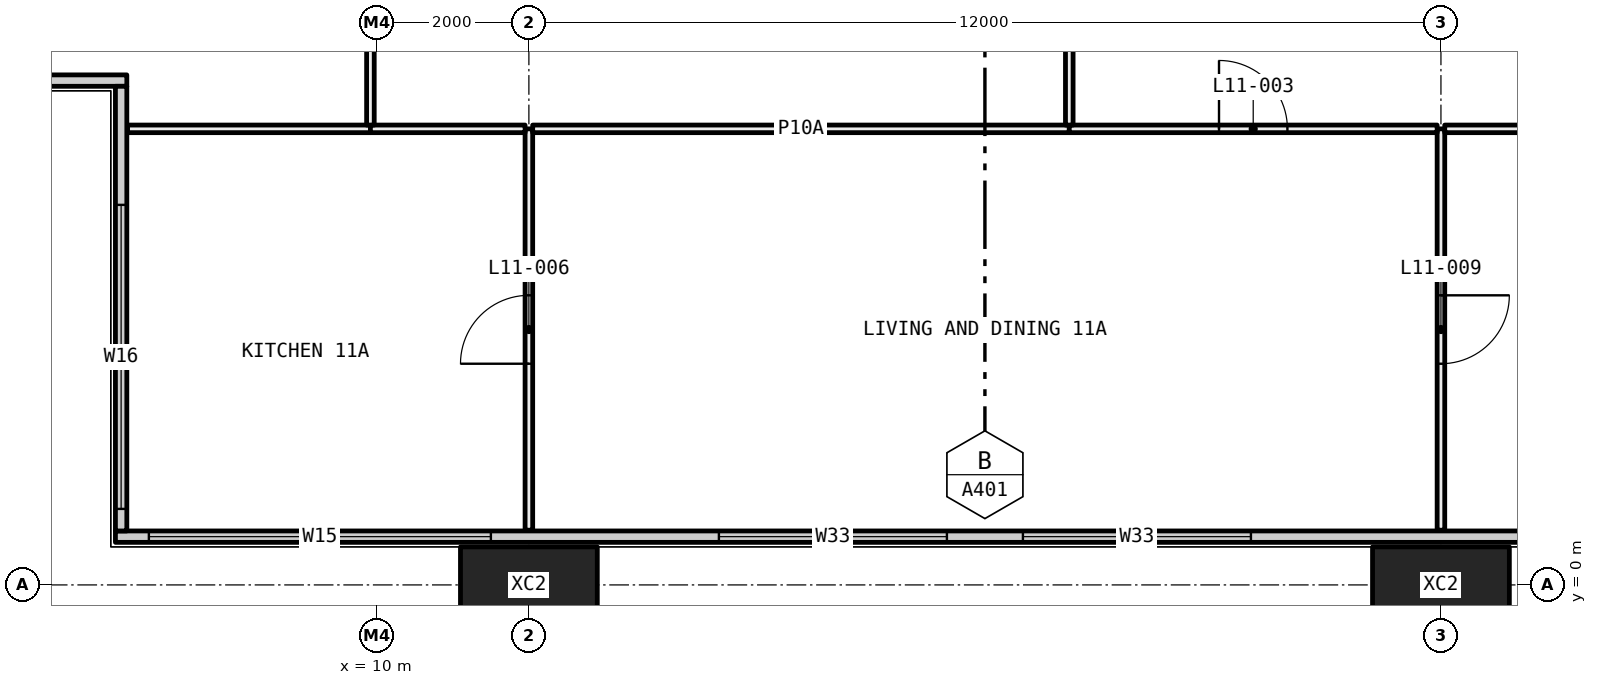
"""IFC4 building model, lengths in metres.
Left out: names, types, materials, properties, quantities, classifications, styles, units other than length and angle.
Written with IfcOpenShell. Run it as: python <this file> out.ifc"""

import sys

from ifc_helpers import new_model, si_unit, direction, frame, frame_2d, origin, origin_2d, place, context, subcontext, project, spatial, rectangle, hollow_rectangle, extrude, element, fill, save


model = new_model("IFC4")
c1 = context("Model", 3, precision=1e-05, world=origin(), true_north=direction((0.0, 1.0)))
c2 = subcontext(c1, "Body", "Model", "MODEL_VIEW")
j1 = project(units=[si_unit("LENGTHUNIT", "METRE"), si_unit("PLANEANGLEUNIT", "RADIAN")], contexts=[c1])
p1 = place(None, origin())
s1 = spatial("IfcSite", under=j1, at=p1, CompositionType="ELEMENT")
p2 = place(p1, origin())
s2 = spatial("IfcBuilding", under=s1, at=p2, CompositionType="ELEMENT")
p3 = place(p2, frame((0.0, 0.0, 50.7)))
s3 = spatial("IfcBuildingStorey", under=s2, at=p3, CompositionType="ELEMENT", Elevation=50.7)
for number, where, z_axis, x_axis in (
    (1, (12.0, 0.0, -0.4), (0.0, 0.0, 1.0), (1.0, 0.0, 0.0)),
    (2, (24.0, 0.0, -0.4), (0.0, 0.0, 1.0), (1.0, 0.0, 0.0)),
):
    element("IfcColumn", number, at=place(p3, frame(where, z_axis=z_axis, x_axis=x_axis)), inside=s3, PredefinedType="COLUMN", context=c2, shape_type="SweptSolid", body=[
        extrude(hollow_rectangle(XDim=1.8, YDim=1.0, WallThickness=0.07, at=origin_2d()), origin(), (0.0, 0.0, 1.0), 3.45),
    ])
p4 = place(p3, frame((6.56, 0.635, 0.0), z_axis=(0.0, 0.0, 1.0), x_axis=(1.0, 0.0, 0.0)))
e3 = element("IfcWall", 3, at=p4, inside=s3, PredefinedType="ELEMENTEDWALL", context=c2, shape_type="SweptSolid", body=[
    extrude(rectangle(XDim=58.88, YDim=0.15, at=frame_2d((29.44, 0.0))), origin(), (0.0, 0.0, 1.0), 3.05),
])
p5 = place(p4, frame((0.44, 0.0, 0.45)))
e4 = element("IfcOpeningElement", 4, at=p5, cuts=e3, PredefinedType="OPENING", context=c2, shape_type="SweptSolid", body=[
    extrude(rectangle(XDim=4.5, YDim=2.55, at=frame_2d((2.25, 1.275))), frame((0.0, 0.085, 0.0), z_axis=(0.0, -1.0, 0.0), x_axis=(1.0, 0.0, 0.0)), (0.0, 0.0, 1.0), 0.17),
])
p6 = place(p4, frame((7.94, 0.0, 0.45)))
e5 = element("IfcOpeningElement", 5, at=p6, cuts=e3, PredefinedType="OPENING", context=c2, shape_type="SweptSolid", body=[
    extrude(rectangle(XDim=3.0, YDim=2.55, at=frame_2d((1.5, 1.275))), frame((0.0, 0.085, 0.0), z_axis=(0.0, -1.0, 0.0), x_axis=(1.0, 0.0, 0.0)), (0.0, 0.0, 1.0), 0.17),
])
p7 = place(p4, frame((11.94, 0.0, 0.45)))
e6 = element("IfcOpeningElement", 6, at=p7, cuts=e3, PredefinedType="OPENING", context=c2, shape_type="SweptSolid", body=[
    extrude(rectangle(XDim=3.0, YDim=2.55, at=frame_2d((1.5, 1.275))), frame((0.0, 0.085, 0.0), z_axis=(0.0, -1.0, 0.0), x_axis=(1.0, 0.0, 0.0)), (0.0, 0.0, 1.0), 0.17),
])
p8 = place(p4, frame((19.94, 0.0, 0.45)))
e7 = element("IfcOpeningElement", 7, at=p8, cuts=e3, PredefinedType="OPENING", context=c2, shape_type="SweptSolid", body=[
    extrude(rectangle(XDim=3.0, YDim=2.55, at=frame_2d((1.5, 1.275))), frame((0.0, 0.085, 0.0), z_axis=(0.0, -1.0, 0.0), x_axis=(1.0, 0.0, 0.0)), (0.0, 0.0, 1.0), 0.17),
])
p9 = place(p4, frame((23.94, 0.0, 0.45)))
e8 = element("IfcOpeningElement", 8, at=p9, cuts=e3, PredefinedType="OPENING", context=c2, shape_type="SweptSolid", body=[
    extrude(rectangle(XDim=2.0, YDim=2.55, at=frame_2d((1.0, 1.275))), frame((0.0, 0.085, 0.0), z_axis=(0.0, -1.0, 0.0), x_axis=(1.0, 0.0, 0.0)), (0.0, 0.0, 1.0), 0.17),
])
p10 = place(p4, frame((31.94, 0.0, 0.45)))
e9 = element("IfcOpeningElement", 9, at=p10, cuts=e3, PredefinedType="OPENING", context=c2, shape_type="SweptSolid", body=[
    extrude(rectangle(XDim=3.0, YDim=2.55, at=frame_2d((1.5, 1.275))), frame((0.0, 0.085, 0.0), z_axis=(0.0, -1.0, 0.0), x_axis=(1.0, 0.0, 0.0)), (0.0, 0.0, 1.0), 0.17),
])
p11 = place(p4, frame((35.94, 0.0, 0.45)))
e10 = element("IfcOpeningElement", 10, at=p11, cuts=e3, PredefinedType="OPENING", context=c2, shape_type="SweptSolid", body=[
    extrude(rectangle(XDim=3.0, YDim=2.55, at=frame_2d((1.5, 1.275))), frame((0.0, 0.085, 0.0), z_axis=(0.0, -1.0, 0.0), x_axis=(1.0, 0.0, 0.0)), (0.0, 0.0, 1.0), 0.17),
])
p12 = place(p4, frame((43.94, 0.0, 0.45)))
e11 = element("IfcOpeningElement", 11, at=p12, cuts=e3, PredefinedType="OPENING", context=c2, shape_type="SweptSolid", body=[
    extrude(rectangle(XDim=3.0, YDim=2.55, at=frame_2d((1.5, 1.275))), frame((0.0, 0.085, 0.0), z_axis=(0.0, -1.0, 0.0), x_axis=(1.0, 0.0, 0.0)), (0.0, 0.0, 1.0), 0.17),
])
p13 = place(p4, frame((47.94, 0.0, 0.45)))
e12 = element("IfcOpeningElement", 12, at=p13, cuts=e3, PredefinedType="OPENING", context=c2, shape_type="SweptSolid", body=[
    extrude(rectangle(XDim=2.0, YDim=2.55, at=frame_2d((1.0, 1.275))), frame((0.0, 0.085, 0.0), z_axis=(0.0, -1.0, 0.0), x_axis=(1.0, 0.0, 0.0)), (0.0, 0.0, 1.0), 0.17),
])
p14 = place(p4, frame((53.94, 0.0, 0.45)))
e13 = element("IfcOpeningElement", 13, at=p14, cuts=e3, PredefinedType="OPENING", context=c2, shape_type="SweptSolid", body=[
    extrude(rectangle(XDim=4.5, YDim=2.55, at=frame_2d((2.25, 1.275))), frame((0.0, 0.085, 0.0), z_axis=(0.0, -1.0, 0.0), x_axis=(1.0, 0.0, 0.0)), (0.0, 0.0, 1.0), 0.17),
])
p15 = place(p3, frame((0.56, 6.635, 0.0), z_axis=(0.0, 0.0, 1.0), x_axis=(1.0, 0.0, 0.0)))
e14 = element("IfcWall", 14, at=p15, inside=s3, PredefinedType="ELEMENTEDWALL", context=c2, shape_type="SweptSolid", body=[
    extrude(rectangle(XDim=6.15, YDim=0.15, at=frame_2d((3.075, 0.0))), origin(), (0.0, 0.0, 1.0), 3.05),
])
p16 = place(p15, frame((0.44, 0.0, 0.45)))
e15 = element("IfcOpeningElement", 15, at=p16, cuts=e14, PredefinedType="OPENING", context=c2, shape_type="SweptSolid", body=[
    extrude(rectangle(XDim=4.0, YDim=2.55, at=frame_2d((2.0, 1.275))), frame((0.0, 0.085, 0.0), z_axis=(0.0, -1.0, 0.0), x_axis=(1.0, 0.0, 0.0)), (0.0, 0.0, 1.0), 0.17),
])
p17 = place(p3, frame((6.635, 0.71, 0.0), z_axis=(0.0, 0.0, 1.0), x_axis=(0.0, 1.0, 0.0)))
e16 = element("IfcWall", 16, at=p17, inside=s3, PredefinedType="ELEMENTEDWALL", context=c2, shape_type="SweptSolid", body=[
    extrude(rectangle(XDim=5.85, YDim=0.15, at=frame_2d((2.925, 0.0))), origin(), (0.0, 0.0, 1.0), 3.05),
])
p18 = place(p17, frame((0.29, 0.0, 0.45)))
e17 = element("IfcOpeningElement", 17, at=p18, cuts=e16, PredefinedType="OPENING", context=c2, shape_type="SweptSolid", body=[
    extrude(rectangle(XDim=4.0, YDim=2.55, at=frame_2d((2.0, 1.275))), frame((0.0, 0.085, 0.0), z_axis=(0.0, -1.0, 0.0), x_axis=(1.0, 0.0, 0.0)), (0.0, 0.0, 1.0), 0.17),
])
p19 = place(p3, frame((12.0, 0.72, 0.0), z_axis=(0.0, 0.0, 1.0), x_axis=(0.0, 1.0, 0.0)))
e18 = element("IfcWall", 18, at=p19, inside=s3, PredefinedType="PARTITIONING", context=c2, shape_type="SweptSolid", body=[
    extrude(rectangle(XDim=5.28, YDim=0.1, at=frame_2d((2.64, 0.0))), origin(), (0.0, 0.0, 1.0), 2.45),
])
p20 = place(p19, frame((2.19, 0.0, 0.0)))
e19 = element("IfcOpeningElement", 19, at=p20, cuts=e18, PredefinedType="OPENING", context=c2, shape_type="SweptSolid", body=[
    extrude(rectangle(XDim=0.9, YDim=2.1, at=frame_2d((0.45, 1.05))), frame((0.0, 0.06, 0.0), z_axis=(0.0, -1.0, 0.0), x_axis=(1.0, 0.0, 0.0)), (0.0, 0.0, 1.0), 0.12),
])
p21 = place(p3, frame((9.915, 6.0, 0.0), z_axis=(0.0, 0.0, 1.0), x_axis=(-1.0, 0.0, 0.0)))
e20 = element("IfcWall", 20, at=p21, inside=s3, PredefinedType="PARTITIONING", context=c2, shape_type="SweptSolid", body=[
    extrude(rectangle(XDim=3.195, YDim=0.1, at=frame_2d((1.598, 0.0))), origin(), (0.0, 0.0, 1.0), 3.05),
])
p22 = place(p3, frame((11.95, 6.0, 0.0), z_axis=(0.0, 0.0, 1.0), x_axis=(-1.0, 0.0, 0.0)))
e21 = element("IfcWall", 21, at=p22, inside=s3, PredefinedType="PARTITIONING", context=c2, shape_type="SweptSolid", body=[
    extrude(rectangle(XDim=2.035, YDim=0.1, at=frame_2d((1.018, 0.0))), origin(), (0.0, 0.0, 1.0), 2.45),
])
p23 = place(p3, frame((24.0, 0.72, 0.0), z_axis=(0.0, 0.0, 1.0), x_axis=(0.0, 1.0, 0.0)))
e22 = element("IfcWall", 22, at=p23, inside=s3, PredefinedType="PARTITIONING", context=c2, shape_type="SweptSolid", body=[
    extrude(rectangle(XDim=5.28, YDim=0.1, at=frame_2d((2.64, 0.0))), origin(), (0.0, 0.0, 1.0), 2.45),
])
p24 = place(p23, frame((2.19, 0.0, 0.0)))
e23 = element("IfcOpeningElement", 23, at=p24, cuts=e22, PredefinedType="OPENING", context=c2, shape_type="SweptSolid", body=[
    extrude(rectangle(XDim=0.9, YDim=2.1, at=frame_2d((0.45, 1.05))), frame((0.0, 0.06, 0.0), z_axis=(0.0, -1.0, 0.0), x_axis=(1.0, 0.0, 0.0)), (0.0, 0.0, 1.0), 0.12),
])
p25 = place(p3, frame((19.11, 6.0, 0.0), z_axis=(0.0, 0.0, 1.0), x_axis=(-1.0, 0.0, 0.0)))
e24 = element("IfcWall", 24, at=p25, inside=s3, PredefinedType="PARTITIONING", context=c2, shape_type="SweptSolid", body=[
    extrude(rectangle(XDim=7.06, YDim=0.1, at=frame_2d((3.53, 0.0))), origin(), (0.0, 0.0, 1.0), 2.45),
])
p26 = place(p3, frame((23.95, 6.0, 0.0), z_axis=(0.0, 0.0, 1.0), x_axis=(-1.0, 0.0, 0.0)))
e25 = element("IfcWall", 25, at=p26, inside=s3, PredefinedType="PARTITIONING", context=c2, shape_type="SweptSolid", body=[
    extrude(rectangle(XDim=4.84, YDim=0.1, at=frame_2d((2.42, 0.0))), origin(), (0.0, 0.0, 1.0), 2.45),
])
p27 = place(p26, frame((1.97, 0.0, 0.0)))
e26 = element("IfcOpeningElement", 26, at=p27, cuts=e25, PredefinedType="OPENING", context=c2, shape_type="SweptSolid", body=[
    extrude(rectangle(XDim=0.9, YDim=2.1, at=frame_2d((0.45, 1.05))), frame((0.0, 0.06, 0.0), z_axis=(0.0, -1.0, 0.0), x_axis=(1.0, 0.0, 0.0)), (0.0, 0.0, 1.0), 0.12),
])
p28 = place(p3, frame((28.305, 6.0, 0.0), z_axis=(0.0, 0.0, 1.0), x_axis=(-1.0, 0.0, 0.0)))
e27 = element("IfcWall", 27, at=p28, inside=s3, PredefinedType="PARTITIONING", context=c2, shape_type="SweptSolid", body=[
    extrude(rectangle(XDim=4.255, YDim=0.1, at=frame_2d((2.127, 0.0))), origin(), (0.0, 0.0, 1.0), 2.45),
])
p29 = place(p3, frame((9.915, 6.05, 0.0), z_axis=(0.0, 0.0, 1.0), x_axis=(0.0, 1.0, 0.0)))
e28 = element("IfcWall", 28, at=p29, inside=s3, PredefinedType="PARTITIONING", context=c2, shape_type="SweptSolid", body=[
    extrude(rectangle(XDim=5.875, YDim=0.1, at=frame_2d((2.938, 0.0))), origin(), (0.0, 0.0, 1.0), 2.45),
])
p30 = place(p29, frame((2.488, 0.0, 0.0)))
e29 = element("IfcOpeningElement", 29, at=p30, cuts=e28, PredefinedType="OPENING", context=c2, shape_type="SweptSolid", body=[
    extrude(rectangle(XDim=0.9, YDim=2.1, at=frame_2d((0.45, 1.05))), frame((0.0, 0.06, 0.0), z_axis=(0.0, -1.0, 0.0), x_axis=(1.0, 0.0, 0.0)), (0.0, 0.0, 1.0), 0.12),
])
p31 = place(p3, frame((19.11, 6.05, 0.0), z_axis=(0.0, 0.0, 1.0), x_axis=(0.0, 1.0, 0.0)))
e30 = element("IfcWall", 30, at=p31, inside=s3, PredefinedType="PARTITIONING", context=c2, shape_type="SweptSolid", body=[
    extrude(rectangle(XDim=5.95, YDim=0.1, at=frame_2d((2.975, 0.0))), origin(), (0.0, 0.0, 1.0), 2.45),
])
p32 = place(p31, frame((2.525, 0.0, 0.0)))
e31 = element("IfcOpeningElement", 31, at=p32, cuts=e30, PredefinedType="OPENING", context=c2, shape_type="SweptSolid", body=[
    extrude(rectangle(XDim=0.9, YDim=2.1, at=frame_2d((0.45, 1.05))), frame((0.0, 0.06, 0.0), z_axis=(0.0, -1.0, 0.0), x_axis=(1.0, 0.0, 0.0)), (0.0, 0.0, 1.0), 0.12),
])
p33 = place(p5, origin())
e32 = element("IfcWindow", 32, at=p33, inside=s3, PartitioningType="SINGLE_PANEL", PredefinedType="WINDOW", context=c2, shape_type="SweptSolid", body=[
    extrude(rectangle(XDim=4.5, YDim=2.55, at=frame_2d((2.25, 1.275))), frame((0.0, 0.03, 0.0), z_axis=(0.0, -1.0, 0.0), x_axis=(1.0, 0.0, 0.0)), (0.0, 0.0, 1.0), 0.06),
])
fill(e4, e32)
p34 = place(p6, origin())
e33 = element("IfcWindow", 33, at=p34, inside=s3, PartitioningType="SINGLE_PANEL", PredefinedType="WINDOW", context=c2, shape_type="SweptSolid", body=[
    extrude(rectangle(XDim=3.0, YDim=2.55, at=frame_2d((1.5, 1.275))), frame((0.0, 0.03, 0.0), z_axis=(0.0, -1.0, 0.0), x_axis=(1.0, 0.0, 0.0)), (0.0, 0.0, 1.0), 0.06),
])
fill(e5, e33)
p35 = place(p7, origin())
e34 = element("IfcWindow", 34, at=p35, inside=s3, PartitioningType="SINGLE_PANEL", PredefinedType="WINDOW", context=c2, shape_type="SweptSolid", body=[
    extrude(rectangle(XDim=3.0, YDim=2.55, at=frame_2d((1.5, 1.275))), frame((0.0, 0.03, 0.0), z_axis=(0.0, -1.0, 0.0), x_axis=(1.0, 0.0, 0.0)), (0.0, 0.0, 1.0), 0.06),
])
fill(e6, e34)
p36 = place(p18, origin())
e35 = element("IfcWindow", 35, at=p36, inside=s3, PartitioningType="SINGLE_PANEL", PredefinedType="WINDOW", context=c2, shape_type="SweptSolid", body=[
    extrude(rectangle(XDim=4.0, YDim=2.55, at=frame_2d((2.0, 1.275))), frame((0.0, 0.03, 0.0), z_axis=(0.0, -1.0, 0.0), x_axis=(1.0, 0.0, 0.0)), (0.0, 0.0, 1.0), 0.06),
])
fill(e17, e35)
p37 = place(p27, frame((0.9, 0.0, 0.0), x_axis=(-1.0, 0.0, 0.0)))
e36 = element("IfcDoor", 36, at=p37, inside=s3, OperationType="SINGLE_SWING_RIGHT", PredefinedType="DOOR", context=c2, shape_type="SweptSolid", body=[
    extrude(rectangle(XDim=0.9, YDim=2.1, at=frame_2d((0.45, 1.05))), frame((0.0, 0.025, 0.0), z_axis=(0.0, -1.0, 0.0), x_axis=(1.0, 0.0, 0.0)), (0.0, 0.0, 1.0), 0.05),
])
fill(e26, e36)
p38 = place(p20, origin())
e37 = element("IfcDoor", 37, at=p38, inside=s3, OperationType="SINGLE_SWING_RIGHT", PredefinedType="DOOR", context=c2, shape_type="SweptSolid", body=[
    extrude(rectangle(XDim=0.9, YDim=2.1, at=frame_2d((0.45, 1.05))), frame((0.0, 0.025, 0.0), z_axis=(0.0, -1.0, 0.0), x_axis=(1.0, 0.0, 0.0)), (0.0, 0.0, 1.0), 0.05),
])
fill(e19, e37)
p39 = place(p24, frame((0.9, 0.0, 0.0), x_axis=(-1.0, 0.0, 0.0)))
e38 = element("IfcDoor", 38, at=p39, inside=s3, OperationType="SINGLE_SWING_RIGHT", PredefinedType="DOOR", context=c2, shape_type="SweptSolid", body=[
    extrude(rectangle(XDim=0.9, YDim=2.1, at=frame_2d((0.45, 1.05))), frame((0.0, 0.025, 0.0), z_axis=(0.0, -1.0, 0.0), x_axis=(1.0, 0.0, 0.0)), (0.0, 0.0, 1.0), 0.05),
])
fill(e23, e38)
save(model, sys.argv[1])
